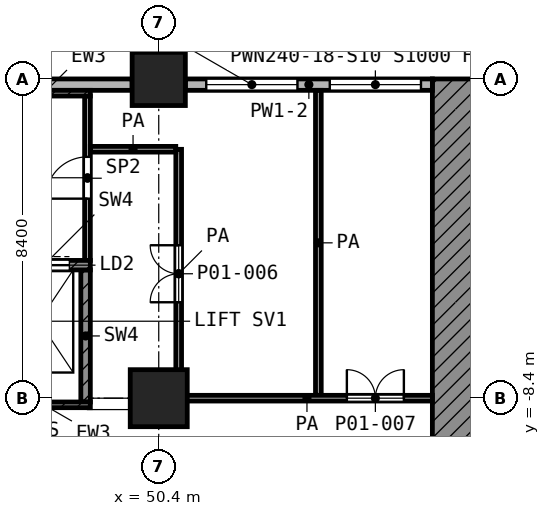
"""IFC4 building model, lengths in metres.
Left out: names, types, materials, properties, quantities, classifications, styles, units other than length and angle.
Written with IfcOpenShell. Run it as: python <this file> out.ifc"""

import sys

from ifc_helpers import new_model, si_unit, direction, frame, frame_2d, origin, origin_2d, place, context, subcontext, project, spatial, polyline, rectangle, outline, extrude, element, fill, save


model = new_model("IFC4")
c1 = context("Model", 3, precision=1e-05, world=origin(), true_north=direction((0.0, 1.0)))
c2 = subcontext(c1, "Body", "Model", "MODEL_VIEW")
j1 = project(units=[si_unit("LENGTHUNIT", "METRE"), si_unit("PLANEANGLEUNIT", "RADIAN")], contexts=[c1])
p1 = place(None, origin())
s1 = spatial("IfcSite", under=j1, at=p1, CompositionType="ELEMENT")
p2 = place(p1, origin())
s2 = spatial("IfcBuilding", under=s1, at=p2, CompositionType="ELEMENT")
p3 = place(p2, origin())
s3 = spatial("IfcBuildingStorey", under=s2, at=p3, CompositionType="ELEMENT", Elevation=0.0)
p4 = place(p3, frame((50.4, 0.0, 0.0), z_axis=(0.0, 0.0, 1.0), x_axis=(1.0, 0.0, 0.0)))
e1 = element("IfcColumn", 1, at=p4, inside=s3, PredefinedType="COLUMN", context=c2, shape_type="SweptSolid", body=[
    extrude(rectangle(XDim=1.4, YDim=1.4, at=origin_2d()), origin(), (0.0, 0.0, 1.0), 7.0),
])
p5 = place(p3, frame((50.4, -8.4, 0.0), z_axis=(0.0, 0.0, 1.0), x_axis=(1.0, 0.0, 0.0)))
e2 = element("IfcColumn", 2, at=p5, inside=s3, PredefinedType="COLUMN", context=c2, shape_type="SweptSolid", body=[
    extrude(rectangle(XDim=1.5, YDim=1.5, at=origin_2d()), origin(), (0.0, 0.0, 1.0), 7.0),
])
p6 = place(p3, frame((0.0, 0.0, 0.0), z_axis=(0.0, -1.0, 0.0), x_axis=(1.0, 0.0, 0.0)))
e3 = element("IfcWall", 3, at=p6, inside=s3, PredefinedType="SHEAR", context=c2, shape_type="SweptSolid", body=[
    extrude(outline(polyline([(60.0, 7.0), (60.0, 6.75), (60.0, 4.5), (60.0, 2.25), (60.0, 0.0), (57.6, 0.0), (57.6, 7.0), (60.0, 7.0)])), origin(), (0.0, 0.0, 1.0), 33.6),
])
p7 = place(p3, frame((57.6, -0.15, 0.0), z_axis=(0.0, 0.0, 1.0), x_axis=(-1.0, 0.0, 0.0)))
e4 = element("IfcWall", 4, at=p7, inside=s3, PredefinedType="SOLIDWALL", context=c2, shape_type="SweptSolid", body=[
    extrude(rectangle(XDim=6.5, YDim=0.3, at=frame_2d((3.25, 0.0))), origin(), (0.0, 0.0, 1.0), 6.65),
])
p8 = place(p7, frame((0.3, 0.0, 1.0)))
e5 = element("IfcOpeningElement", 5, at=p8, cuts=e4, PredefinedType="OPENING", context=c2, shape_type="SweptSolid", body=[
    extrude(rectangle(XDim=2.4, YDim=1.8, at=frame_2d((1.2, 0.9))), frame((0.0, 0.16, 0.0), z_axis=(0.0, -1.0, 0.0), x_axis=(1.0, 0.0, 0.0)), (0.0, 0.0, 1.0), 0.32),
])
p9 = place(p7, frame((3.55, 0.0, 1.0)))
e6 = element("IfcOpeningElement", 6, at=p9, cuts=e4, PredefinedType="OPENING", context=c2, shape_type="SweptSolid", body=[
    extrude(rectangle(XDim=2.4, YDim=1.8, at=frame_2d((1.2, 0.9))), frame((0.0, 0.16, 0.0), z_axis=(0.0, -1.0, 0.0), x_axis=(1.0, 0.0, 0.0)), (0.0, 0.0, 1.0), 0.32),
])
p10 = place(p3, frame((49.7, -0.15, 0.0), z_axis=(0.0, 0.0, 1.0), x_axis=(-1.0, 0.0, 0.0)))
e7 = element("IfcWall", 7, at=p10, inside=s3, PredefinedType="SOLIDWALL", context=c2, shape_type="SweptSolid", body=[
    extrude(rectangle(XDim=7.0, YDim=0.3, at=frame_2d((3.5, 0.0))), origin(), (0.0, 0.0, 1.0), 5.25),
])
p11 = place(p10, frame((4.475, 0.0, 0.0)))
e8 = element("IfcOpeningElement", 8, at=p11, cuts=e7, PredefinedType="OPENING", context=c2, shape_type="SweptSolid", body=[
    extrude(rectangle(XDim=1.4, YDim=2.1, at=frame_2d((0.7, 1.05))), frame((0.0, 0.16, 0.0), z_axis=(0.0, -1.0, 0.0), x_axis=(1.0, 0.0, 0.0)), (0.0, 0.0, 1.0), 0.32),
])
for number, where, z_axis, x_axis in (
    (9, (46.15, -0.375, 0.0), (0.0, 0.0, 1.0), (1.0, 0.0, 0.0)),
    (10, (46.15, -8.575, 0.0), (0.0, 0.0, 1.0), (1.0, 0.0, 0.0)),
):
    element("IfcWall", number, at=place(p3, frame(where, z_axis=z_axis, x_axis=x_axis)), inside=s3, PredefinedType="SHEAR", context=c2, shape_type="SweptSolid", body=[
        extrude(rectangle(XDim=2.45, YDim=0.15, at=frame_2d((1.225, 0.0))), origin(), (0.0, 0.0, 1.0), 6.65),
    ])
p12 = place(p3, frame((46.15, -4.9, 0.0), z_axis=(0.0, 0.0, 1.0), x_axis=(1.0, 0.0, 0.0)))
e11 = element("IfcWall", 11, at=p12, inside=s3, PredefinedType="SHEAR", context=c2, shape_type="SweptSolid", body=[
    extrude(rectangle(XDim=2.45, YDim=0.25, at=frame_2d((1.225, 0.0))), origin(), (0.0, 0.0, 1.0), 6.65),
])
p13 = place(p12, frame((0.6, 0.0, 0.0)))
e12 = element("IfcOpeningElement", 12, at=p13, cuts=e11, PredefinedType="OPENING", context=c2, shape_type="SweptSolid", body=[
    extrude(rectangle(XDim=1.3, YDim=2.1, at=frame_2d((0.65, 1.05))), frame((0.0, 0.135, 0.0), z_axis=(0.0, -1.0, 0.0), x_axis=(1.0, 0.0, 0.0)), (0.0, 0.0, 1.0), 0.27),
])
p14 = place(p3, frame((48.475, -8.5, 0.0), z_axis=(0.0, 0.0, 1.0), x_axis=(0.0, 1.0, 0.0)))
e13 = element("IfcWall", 13, at=p14, inside=s3, PredefinedType="SHEAR", context=c2, shape_type="SweptSolid", body=[
    extrude(rectangle(XDim=3.475, YDim=0.25, at=frame_2d((1.738, 0.0))), origin(), (0.0, 0.0, 1.0), 6.65),
])
p15 = place(p3, frame((48.525, -4.775, 0.0), z_axis=(0.0, 0.0, 1.0), x_axis=(0.0, 1.0, 0.0)))
e14 = element("IfcWall", 14, at=p15, inside=s3, PredefinedType="PARTITIONING", context=c2, shape_type="SweptSolid", body=[
    extrude(rectangle(XDim=4.325, YDim=0.15, at=frame_2d((2.163, 0.0))), origin(), (0.0, 0.0, 1.0), 6.65),
])
p16 = place(p15, frame((1.625, 0.0, 0.0)))
e15 = element("IfcOpeningElement", 15, at=p16, cuts=e14, PredefinedType="OPENING", context=c2, shape_type="SweptSolid", body=[
    extrude(rectangle(XDim=1.1, YDim=2.1, at=frame_2d((0.55, 1.05))), frame((0.0, 0.085, 0.0), z_axis=(0.0, -1.0, 0.0), x_axis=(1.0, 0.0, 0.0)), (0.0, 0.0, 1.0), 0.17),
])
p17 = place(p3, frame((51.0, -8.4, 0.0), z_axis=(0.0, 0.0, 1.0), x_axis=(1.0, 0.0, 0.0)))
e16 = element("IfcWall", 16, at=p17, inside=s3, PredefinedType="PARTITIONING", context=c2, shape_type="SweptSolid", body=[
    extrude(rectangle(XDim=6.6, YDim=0.15, at=frame_2d((3.3, 0.0))), origin(), (0.0, 0.0, 1.0), 6.65),
])
p18 = place(p17, frame((4.35, 0.0, 0.0)))
e17 = element("IfcOpeningElement", 17, at=p18, cuts=e16, PredefinedType="OPENING", context=c2, shape_type="SweptSolid", body=[
    extrude(rectangle(XDim=1.5, YDim=2.1, at=frame_2d((0.75, 1.05))), frame((0.0, 0.085, 0.0), z_axis=(0.0, -1.0, 0.0), x_axis=(1.0, 0.0, 0.0)), (0.0, 0.0, 1.0), 0.17),
])
p19 = place(p3, frame((48.6, -1.85, 0.0), z_axis=(0.0, 0.0, 1.0), x_axis=(1.0, 0.0, 0.0)))
e18 = element("IfcWall", 18, at=p19, inside=s3, PredefinedType="PARTITIONING", context=c2, shape_type="SweptSolid", body=[
    extrude(rectangle(XDim=2.248, YDim=0.15, at=frame_2d((1.124, 0.0))), origin(), (0.0, 0.0, 1.0), 6.65),
])
p20 = place(p3, frame((50.925, -8.4, 0.0), z_axis=(0.0, 0.0, 1.0), x_axis=(0.0, 1.0, 0.0)))
e19 = element("IfcWall", 19, at=p20, inside=s3, PredefinedType="PARTITIONING", context=c2, shape_type="SweptSolid", body=[
    extrude(rectangle(XDim=6.548, YDim=0.15, at=frame_2d((3.274, 0.0))), origin(), (0.0, 0.0, 1.0), 6.65),
])
p21 = place(p20, frame((2.524, 0.0, 0.0)))
e20 = element("IfcOpeningElement", 20, at=p21, cuts=e19, PredefinedType="OPENING", context=c2, shape_type="SweptSolid", body=[
    extrude(rectangle(XDim=1.5, YDim=2.1, at=frame_2d((0.75, 1.05))), frame((0.0, 0.085, 0.0), z_axis=(0.0, -1.0, 0.0), x_axis=(1.0, 0.0, 0.0)), (0.0, 0.0, 1.0), 0.17),
])
p22 = place(p3, frame((54.6, -8.325, 0.0), z_axis=(0.0, 0.0, 1.0), x_axis=(0.0, 1.0, 0.0)))
e21 = element("IfcWall", 21, at=p22, inside=s3, PredefinedType="PARTITIONING", context=c2, shape_type="SweptSolid", body=[
    extrude(rectangle(XDim=8.025, YDim=0.15, at=frame_2d((4.012, 0.0))), origin(), (0.0, 0.0, 1.0), 6.65),
])
p23 = place(p8, origin())
e22 = element("IfcWindow", 22, at=p23, inside=s3, PartitioningType="SINGLE_PANEL", PredefinedType="WINDOW", context=c2, shape_type="SweptSolid", body=[
    extrude(rectangle(XDim=2.4, YDim=1.8, at=frame_2d((1.2, 0.9))), frame((0.0, 0.03, 0.0), z_axis=(0.0, -1.0, 0.0), x_axis=(1.0, 0.0, 0.0)), (0.0, 0.0, 1.0), 0.06),
])
fill(e5, e22)
p24 = place(p9, origin())
e23 = element("IfcWindow", 23, at=p24, inside=s3, PartitioningType="SINGLE_PANEL", PredefinedType="WINDOW", context=c2, shape_type="SweptSolid", body=[
    extrude(rectangle(XDim=2.4, YDim=1.8, at=frame_2d((1.2, 0.9))), frame((0.0, 0.03, 0.0), z_axis=(0.0, -1.0, 0.0), x_axis=(1.0, 0.0, 0.0)), (0.0, 0.0, 1.0), 0.06),
])
fill(e6, e23)
p25 = place(p13, origin())
e24 = element("IfcDoor", 24, at=p25, inside=s3, OperationType="DOUBLE_DOOR_SLIDING", PredefinedType="DOOR", context=c2, shape_type="SweptSolid", body=[
    extrude(rectangle(XDim=1.3, YDim=2.1, at=frame_2d((0.65, 1.05))), frame((0.0, 0.025, 0.0), z_axis=(0.0, -1.0, 0.0), x_axis=(1.0, 0.0, 0.0)), (0.0, 0.0, 1.0), 0.05),
])
fill(e12, e24)
p26 = place(p16, origin())
e25 = element("IfcDoor", 25, at=p26, inside=s3, OperationType="SINGLE_SWING_LEFT", PredefinedType="DOOR", context=c2, shape_type="SweptSolid", body=[
    extrude(rectangle(XDim=1.1, YDim=2.1, at=frame_2d((0.55, 1.05))), frame((0.0, 0.025, 0.0), z_axis=(0.0, -1.0, 0.0), x_axis=(1.0, 0.0, 0.0)), (0.0, 0.0, 1.0), 0.05),
])
fill(e15, e25)
p27 = place(p21, origin())
e26 = element("IfcDoor", 26, at=p27, inside=s3, OperationType="DOUBLE_DOOR_SINGLE_SWING", PredefinedType="DOOR", context=c2, shape_type="SweptSolid", body=[
    extrude(rectangle(XDim=1.5, YDim=2.1, at=frame_2d((0.75, 1.05))), frame((0.0, 0.025, 0.0), z_axis=(0.0, -1.0, 0.0), x_axis=(1.0, 0.0, 0.0)), (0.0, 0.0, 1.0), 0.05),
])
fill(e20, e26)
p28 = place(p18, origin())
e27 = element("IfcDoor", 27, at=p28, inside=s3, OperationType="DOUBLE_DOOR_SINGLE_SWING", PredefinedType="DOOR", context=c2, shape_type="SweptSolid", body=[
    extrude(rectangle(XDim=1.5, YDim=2.1, at=frame_2d((0.75, 1.05))), frame((0.0, 0.025, 0.0), z_axis=(0.0, -1.0, 0.0), x_axis=(1.0, 0.0, 0.0)), (0.0, 0.0, 1.0), 0.05),
])
fill(e17, e27)
save(model, sys.argv[1])
